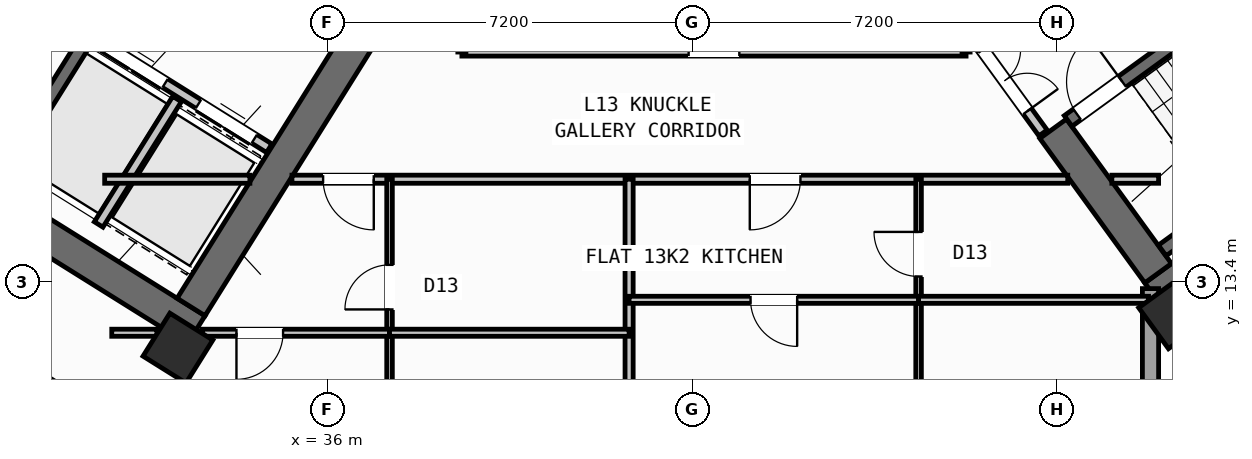
"""IFC4 building model, lengths in metres.
Left out: names, types, materials, properties, quantities, classifications, styles, units other than length and angle.
Written with IfcOpenShell. Run it as: python <this file> out.ifc"""

import sys

from ifc_helpers import new_model, si_unit, direction, frame, frame_2d, origin, origin_2d, place, context, subcontext, project, spatial, rectangle, hollow_rectangle, extrude, source, transform, mapped, element, fill, save


model = new_model("IFC4")
c1 = context("Model", 3, precision=1e-05, world=origin(), true_north=direction((0.0, 1.0)))
c2 = subcontext(c1, "Body", "Model", "MODEL_VIEW")
j1 = project(units=[si_unit("LENGTHUNIT", "METRE"), si_unit("PLANEANGLEUNIT", "RADIAN")], contexts=[c1])
p1 = place(None, origin())
s1 = spatial("IfcSite", under=j1, at=p1, CompositionType="ELEMENT")
p2 = place(p1, origin())
s2 = spatial("IfcBuilding", under=s1, at=p2, CompositionType="ELEMENT")
p3 = place(p2, frame((0.0, 0.0, 52.8)))
s3 = spatial("IfcBuildingStorey", under=s2, at=p3, CompositionType="ELEMENT", Elevation=52.8)
p4 = place(p3, frame((33.409, 12.45, 0.0), z_axis=(0.0, 0.0, 1.0), x_axis=(-0.848051132073, 0.529914405721, 0.0)))
e1 = element("IfcWall", 1, at=p4, inside=s3, PredefinedType="SHEAR", context=c2, shape_type="SweptSolid", body=[
    extrude(rectangle(XDim=13.24, YDim=0.65, at=frame_2d((6.62, 0.0))), origin(), (0.0, 0.0, 1.0), 3.35),
])
p5 = place(p3, frame((36.683, 18.304, 0.0), z_axis=(0.0, 0.0, 1.0), x_axis=(-0.529899109053, -0.848060690178, 0.0)))
e2 = element("IfcWall", 2, at=p5, inside=s3, PredefinedType="SHEAR", context=c2, shape_type="SweptSolid", body=[
    extrude(rectangle(XDim=6.375, YDim=0.65, at=frame_2d((3.188, 0.0))), origin(), (0.0, 0.0, 1.0), 3.35),
])
p6 = place(p3, frame((52.318, 13.11, 0.0), z_axis=(0.0, 0.0, 1.0), x_axis=(0.809019445368, 0.587781878776, 0.0)))
e3 = element("IfcWall", 3, at=p6, inside=s3, PredefinedType="SHEAR", context=c2, shape_type="SweptSolid", body=[
    extrude(rectangle(XDim=12.44, YDim=0.65, at=frame_2d((6.22, 0.0))), origin(), (0.0, 0.0, 1.0), 3.35),
])
p7 = place(p3, frame((52.39, 13.564, 0.0), z_axis=(0.0, 0.0, 1.0), x_axis=(-0.58779688989, 0.809008539037, 0.0)))
e4 = element("IfcWall", 4, at=p7, inside=s3, PredefinedType="SHEAR", context=c2, shape_type="SweptSolid", body=[
    extrude(rectangle(XDim=3.525, YDim=0.65, at=frame_2d((1.763, 0.0))), origin(), (0.0, 0.0, 1.0), 3.35),
])
m1 = source(origin(), c2, "Body", "SweptSolid", [
    extrude(hollow_rectangle(XDim=1.0, YDim=1.0, WallThickness=0.04, at=origin_2d()), origin(), (0.0, 0.0, 1.0), 3.6),
])
for number, where, z_axis, x_axis in (
    (5, (33.046, 12.087, 0.0), (0.0, 0.0, 1.0), (-0.848, 0.53, 0.0)),
    (6, (52.705, 12.773, 0.0), (0.0, 0.0, 1.0), (0.809, 0.588, 0.0)),
):
    element("IfcColumn", number, at=place(p3, frame(where, z_axis=z_axis, x_axis=x_axis)), inside=s3, PredefinedType="COLUMN", context=c2, shape_type="MappedRepresentation", body=[
        mapped(m1, transform((0.0, 0.0, 0.0), scale=1.0)),
    ])
p8 = place(p3, frame((56.581, 7.439, 0.0), z_axis=(0.0, 0.0, 1.0), x_axis=(-0.587785875463, 0.809016541614, 0.0)))
e7 = element("IfcWall", 7, at=p8, inside=s3, PredefinedType="STANDARD", context=c2, shape_type="SweptSolid", body=[
    extrude(rectangle(XDim=6.774, YDim=0.32, at=frame_2d((3.387, 0.0))), origin(), (0.0, 0.0, 1.0), 2.725),
])
p9 = place(p8, frame((1.556, 0.0, 0.8)))
e8 = element("IfcOpeningElement", 8, at=p9, cuts=e7, PredefinedType="OPENING", context=c2, shape_type="SweptSolid", body=[
    extrude(rectangle(XDim=2.1, YDim=1.55, at=frame_2d((1.05, 0.775))), frame((0.0, 0.17, 0.0), z_axis=(0.0, -1.0, 0.0), x_axis=(1.0, 0.0, 0.0)), (0.0, 0.0, 1.0), 0.34),
])
p10 = place(p3, frame((52.24, 13.261, 0.0), z_axis=(0.0, 0.0, 1.0), x_axis=(0.0, -1.0, 0.0)))
e9 = element("IfcWall", 9, at=p10, inside=s3, PredefinedType="STANDARD", context=c2, shape_type="SweptSolid", body=[
    extrude(rectangle(XDim=9.795, YDim=0.32, at=frame_2d((4.897, 0.0))), origin(), (0.0, 0.0, 1.0), 3.35),
])
p11 = place(p10, frame((2.349, 0.0, 0.8)))
e10 = element("IfcOpeningElement", 10, at=p11, cuts=e9, PredefinedType="OPENING", context=c2, shape_type="SweptSolid", body=[
    extrude(rectangle(XDim=2.1, YDim=1.55, at=frame_2d((1.05, 0.775))), frame((0.0, 0.17, 0.0), z_axis=(0.0, -1.0, 0.0), x_axis=(1.0, 0.0, 0.0)), (0.0, 0.0, 1.0), 0.34),
])
p12 = place(p10, frame((7.03, 0.0, 0.85)))
e11 = element("IfcOpeningElement", 11, at=p12, cuts=e9, PredefinedType="OPENING", context=c2, shape_type="SweptSolid", body=[
    extrude(rectangle(XDim=1.8, YDim=1.5, at=frame_2d((0.9, 0.75))), frame((0.0, 0.17, 0.0), z_axis=(0.0, -1.0, 0.0), x_axis=(1.0, 0.0, 0.0)), (0.0, 0.0, 1.0), 0.34),
])
p13 = place(p3, frame((31.288, 18.256, 0.0), z_axis=(0.0, 0.0, 1.0), x_axis=(-0.529943379326, -0.848033026897, 0.0)))
e12 = element("IfcWall", 12, at=p13, inside=s3, PredefinedType="SHEAR", context=c2, shape_type="SweptSolid", body=[
    extrude(rectangle(XDim=3.16, YDim=0.26, at=frame_2d((1.58, 0.0))), origin(), (0.0, 0.0, 1.0), 3.35),
])
p14 = place(p3, frame((34.848, 16.031, 0.0), z_axis=(0.0, 0.0, 1.0), x_axis=(-0.848044042236, 0.529925751807, 0.0)))
e13 = element("IfcWall", 13, at=p14, inside=s3, PredefinedType="STANDARD", context=c2, shape_type="SweptSolid", body=[
    extrude(rectangle(XDim=4.198, YDim=0.2, at=frame_2d((2.099, 0.0))), origin(), (0.0, 0.0, 1.0), 3.34),
])
p15 = place(p14, frame((0.348, 0.0, 0.0)))
e14 = element("IfcOpeningElement", 14, at=p15, cuts=e13, PredefinedType="OPENING", context=c2, shape_type="SweptSolid", body=[
    extrude(rectangle(XDim=1.3, YDim=2.2, at=frame_2d((0.65, 1.1))), frame((0.0, 0.11, 0.0), z_axis=(0.0, -1.0, 0.0), x_axis=(1.0, 0.0, 0.0)), (0.0, 0.0, 1.0), 0.22),
])
p16 = place(p14, frame((2.423, 0.0, 0.0)))
e15 = element("IfcOpeningElement", 15, at=p16, cuts=e13, PredefinedType="OPENING", context=c2, shape_type="SweptSolid", body=[
    extrude(rectangle(XDim=1.45, YDim=2.25, at=frame_2d((0.725, 1.125))), frame((0.0, 0.11, 0.0), z_axis=(0.0, -1.0, 0.0), x_axis=(1.0, 0.0, 0.0)), (0.0, 0.0, 1.0), 0.22),
])
p17 = place(p3, frame((33.029, 17.003, 0.0), z_axis=(0.0, 0.0, 1.0), x_axis=(-0.529916267533, -0.848049968695, 0.0)))
e16 = element("IfcWall", 16, at=p17, inside=s3, PredefinedType="STANDARD", context=c2, shape_type="SweptSolid", body=[
    extrude(rectangle(XDim=2.92, YDim=0.2, at=frame_2d((1.46, 0.0))), origin(), (0.0, 0.0, 1.0), 3.34),
])
p18 = place(p3, frame((52.472, 14.013, 0.0), z_axis=(0.0, 0.0, 1.0), x_axis=(0.809028366311, 0.587769599847, 0.0)))
e17 = element("IfcWall", 17, at=p18, inside=s3, PredefinedType="SHEAR", context=c2, shape_type="SweptSolid", body=[
    extrude(rectangle(XDim=7.33, YDim=0.26, at=frame_2d((3.665, 0.0))), origin(), (0.0, 0.0, 1.0), 3.35),
])
p19 = place(p3, frame((50.615, 16.57, 0.0), z_axis=(0.0, 0.0, 1.0), x_axis=(0.809028366311, 0.587769599847, 0.0)))
e18 = element("IfcWall", 18, at=p19, inside=s3, PredefinedType="SHEAR", context=c2, shape_type="SweptSolid", body=[
    extrude(rectangle(XDim=7.33, YDim=0.26, at=frame_2d((3.665, 0.0))), origin(), (0.0, 0.0, 1.0), 3.35),
])
p20 = place(p19, frame((0.22, 0.0, 0.0)))
e19 = element("IfcOpeningElement", 19, at=p20, cuts=e18, PredefinedType="OPENING", context=c2, shape_type="SweptSolid", body=[
    extrude(rectangle(XDim=1.1, YDim=2.1, at=frame_2d((0.55, 1.05))), frame((0.0, 0.14, 0.0), z_axis=(0.0, -1.0, 0.0), x_axis=(1.0, 0.0, 0.0)), (0.0, 0.0, 1.0), 0.28),
])
p21 = place(p3, frame((32.164, 10.374, 0.0), z_axis=(0.0, 0.0, 1.0), x_axis=(-0.848044107957, 0.529925646633, 0.0)))
e20 = element("IfcWall", 20, at=p21, inside=s3, PredefinedType="PARTITIONING", context=c2, shape_type="SweptSolid", body=[
    extrude(rectangle(XDim=15.57, YDim=0.16, at=frame_2d((7.785, 0.0))), origin(), (0.0, 0.0, 1.0), 3.34),
])
p22 = place(p21, frame((10.83, 0.0, 0.0)))
e21 = element("IfcOpeningElement", 21, at=p22, cuts=e20, PredefinedType="OPENING", context=c2, shape_type="SweptSolid", body=[
    extrude(rectangle(XDim=1.0, YDim=2.1, at=frame_2d((0.5, 1.05))), frame((0.0, 0.09, 0.0), z_axis=(0.0, -1.0, 0.0), x_axis=(1.0, 0.0, 0.0)), (0.0, 0.0, 1.0), 0.18),
])
p23 = place(p3, frame((31.6, 15.42, 0.0), z_axis=(0.0, 0.0, 1.0), x_axis=(1.0, 0.0, 0.0)))
e22 = element("IfcWall", 22, at=p23, inside=s3, PredefinedType="PARTITIONING", context=c2, shape_type="SweptSolid", body=[
    extrude(rectangle(XDim=2.866, YDim=0.16, at=frame_2d((1.433, 0.0))), origin(), (0.0, 0.0, 1.0), 3.34),
])
p24 = place(p3, frame((35.296, 15.42, 0.0), z_axis=(0.0, 0.0, 1.0), x_axis=(1.0, 0.0, 0.0)))
e23 = element("IfcWall", 23, at=p24, inside=s3, PredefinedType="PARTITIONING", context=c2, shape_type="SweptSolid", body=[
    extrude(rectangle(XDim=15.311, YDim=0.16, at=frame_2d((7.655, 0.0))), origin(), (0.0, 0.0, 1.0), 3.34),
])
p25 = place(p24, frame((0.615, 0.0, 0.0)))
e24 = element("IfcOpeningElement", 24, at=p25, cuts=e23, PredefinedType="OPENING", context=c2, shape_type="SweptSolid", body=[
    extrude(rectangle(XDim=1.0, YDim=2.1, at=frame_2d((0.5, 1.05))), frame((0.0, 0.09, 0.0), z_axis=(0.0, -1.0, 0.0), x_axis=(1.0, 0.0, 0.0)), (0.0, 0.0, 1.0), 0.18),
])
p26 = place(p24, frame((9.035, 0.0, 0.0)))
e25 = element("IfcOpeningElement", 25, at=p26, cuts=e23, PredefinedType="OPENING", context=c2, shape_type="SweptSolid", body=[
    extrude(rectangle(XDim=1.0, YDim=2.1, at=frame_2d((0.5, 1.05))), frame((0.0, 0.09, 0.0), z_axis=(0.0, -1.0, 0.0), x_axis=(1.0, 0.0, 0.0)), (0.0, 0.0, 1.0), 0.18),
])
p27 = place(p3, frame((51.477, 15.42, 0.0), z_axis=(0.0, 0.0, 1.0), x_axis=(1.0, 0.0, 0.0)))
e26 = element("IfcWall", 26, at=p27, inside=s3, PredefinedType="PARTITIONING", context=c2, shape_type="SweptSolid", body=[
    extrude(rectangle(XDim=0.923, YDim=0.16, at=frame_2d((0.461, 0.0))), origin(), (0.0, 0.0, 1.0), 3.34),
])
p28 = place(p3, frame((38.65, 17.93, 0.0), z_axis=(0.0, 0.0, 1.0), x_axis=(1.0, 0.0, 0.0)))
e27 = element("IfcWall", 27, at=p28, inside=s3, PredefinedType="PARTITIONING", context=c2, shape_type="SweptSolid", body=[
    extrude(rectangle(XDim=9.95, YDim=0.16, at=frame_2d((4.975, 0.0))), origin(), (0.0, 0.0, 1.0), 3.34),
])
p29 = place(p28, frame((4.475, 0.0, 0.0)))
e28 = element("IfcOpeningElement", 28, at=p29, cuts=e27, PredefinedType="OPENING", context=c2, shape_type="SweptSolid", body=[
    extrude(rectangle(XDim=1.0, YDim=2.1, at=frame_2d((0.5, 1.05))), frame((0.0, 0.09, 0.0), z_axis=(0.0, -1.0, 0.0), x_axis=(1.0, 0.0, 0.0)), (0.0, 0.0, 1.0), 0.18),
])
p30 = place(p3, frame((50.119, 16.333, 0.0), z_axis=(0.0, 0.0, 1.0), x_axis=(-0.587749856981, 0.809042709391, 0.0)))
e29 = element("IfcWall", 29, at=p30, inside=s3, PredefinedType="STANDARD", context=c2, shape_type="SweptSolid", body=[
    extrude(rectangle(XDim=2.96, YDim=0.2, at=frame_2d((1.48, 0.0))), origin(), (0.0, 0.0, 1.0), 3.34),
])
p31 = place(p30, frame((0.53, 0.0, 0.0)))
e30 = element("IfcOpeningElement", 30, at=p31, cuts=e29, PredefinedType="OPENING", context=c2, shape_type="SweptSolid", body=[
    extrude(rectangle(XDim=1.5, YDim=2.15, at=frame_2d((0.75, 1.075))), frame((0.0, 0.11, 0.0), z_axis=(0.0, -1.0, 0.0), x_axis=(1.0, 0.0, 0.0)), (0.0, 0.0, 1.0), 0.22),
])
p32 = place(p3, frame((41.95, 1.96, 0.0), z_axis=(0.0, 0.0, 1.0), x_axis=(0.0, 1.0, 0.0)))
e31 = element("IfcWall", 31, at=p32, inside=s3, PredefinedType="PARTITIONING", context=c2, shape_type="SweptSolid", body=[
    extrude(rectangle(XDim=13.46, YDim=0.16, at=frame_2d((6.73, 0.0))), origin(), (0.0, 0.0, 1.0), 3.34),
])
p33 = place(p3, frame((37.222, 1.96, 0.0), z_axis=(0.0, 0.0, 1.0), x_axis=(0.0, 1.0, 0.0)))
e32 = element("IfcWall", 32, at=p33, inside=s3, PredefinedType="PARTITIONING", context=c2, shape_type="SweptSolid", body=[
    extrude(rectangle(XDim=13.46, YDim=0.11, at=frame_2d((6.73, 0.0))), origin(), (0.0, 0.0, 1.0), 3.34),
])
p34 = place(p33, frame((5.2, 0.0, 0.0)))
e33 = element("IfcOpeningElement", 33, at=p34, cuts=e32, PredefinedType="OPENING", context=c2, shape_type="SweptSolid", body=[
    extrude(rectangle(XDim=0.92, YDim=2.08, at=frame_2d((0.46, 1.04))), frame((0.0, 0.065, 0.0), z_axis=(0.0, -1.0, 0.0), x_axis=(1.0, 0.0, 0.0)), (0.0, 0.0, 1.0), 0.13),
])
p35 = place(p33, frame((10.89, 0.0, 0.0)))
e34 = element("IfcOpeningElement", 34, at=p35, cuts=e32, PredefinedType="OPENING", context=c2, shape_type="SweptSolid", body=[
    extrude(rectangle(XDim=0.88, YDim=2.08, at=frame_2d((0.44, 1.04))), frame((0.0, 0.065, 0.0), z_axis=(0.0, -1.0, 0.0), x_axis=(1.0, 0.0, 0.0)), (0.0, 0.0, 1.0), 0.13),
])
p36 = place(p3, frame((31.74, 12.39, 0.0), z_axis=(0.0, 0.0, 1.0), x_axis=(1.0, 0.0, 0.0)))
e35 = element("IfcWall", 35, at=p36, inside=s3, PredefinedType="PLUMBINGWALL", context=c2, shape_type="SweptSolid", body=[
    extrude(rectangle(XDim=0.892, YDim=0.14, at=frame_2d((0.446, 0.0))), origin(), (0.0, 0.0, 1.0), 3.34),
])
p37 = place(p3, frame((33.527, 12.39, 0.0), z_axis=(0.0, 0.0, 1.0), x_axis=(1.0, 0.0, 0.0)))
e36 = element("IfcWall", 36, at=p37, inside=s3, PredefinedType="PLUMBINGWALL", context=c2, shape_type="SweptSolid", body=[
    extrude(rectangle(XDim=3.695, YDim=0.14, at=frame_2d((1.847, 0.0))), origin(), (0.0, 0.0, 1.0), 2.525),
])
p38 = place(p37, frame((0.674, 0.0, 0.0)))
e37 = element("IfcOpeningElement", 37, at=p38, cuts=e36, PredefinedType="OPENING", context=c2, shape_type="SweptSolid", body=[
    extrude(rectangle(XDim=0.92, YDim=2.08, at=frame_2d((0.46, 1.04))), frame((0.0, 0.08, 0.0), z_axis=(0.0, -1.0, 0.0), x_axis=(1.0, 0.0, 0.0)), (0.0, 0.0, 1.0), 0.16),
])
p39 = place(p3, frame((37.222, 12.39, 0.0), z_axis=(0.0, 0.0, 1.0), x_axis=(1.0, 0.0, 0.0)))
e38 = element("IfcWall", 38, at=p39, inside=s3, PredefinedType="PLUMBINGWALL", context=c2, shape_type="SweptSolid", body=[
    extrude(rectangle(XDim=4.728, YDim=0.14, at=frame_2d((2.364, 0.0))), origin(), (0.0, 0.0, 1.0), 2.525),
])
p40 = place(p3, frame((47.663, 1.96, 0.0), z_axis=(0.0, 0.0, 1.0), x_axis=(0.0, 1.0, 0.0)))
e39 = element("IfcWall", 39, at=p40, inside=s3, PredefinedType="PARTITIONING", context=c2, shape_type="SweptSolid", body=[
    extrude(rectangle(XDim=13.46, YDim=0.11, at=frame_2d((6.73, 0.0))), origin(), (0.0, 0.0, 1.0), 3.34),
])
p41 = place(p40, frame((6.3, 0.0, 0.0)))
e40 = element("IfcOpeningElement", 40, at=p41, cuts=e39, PredefinedType="OPENING", context=c2, shape_type="SweptSolid", body=[
    extrude(rectangle(XDim=0.92, YDim=2.08, at=frame_2d((0.46, 1.04))), frame((0.0, 0.065, 0.0), z_axis=(0.0, -1.0, 0.0), x_axis=(1.0, 0.0, 0.0)), (0.0, 0.0, 1.0), 0.13),
])
p42 = place(p40, frame((11.54, 0.0, 0.0)))
e41 = element("IfcOpeningElement", 41, at=p42, cuts=e39, PredefinedType="OPENING", context=c2, shape_type="SweptSolid", body=[
    extrude(rectangle(XDim=0.88, YDim=2.08, at=frame_2d((0.44, 1.04))), frame((0.0, 0.065, 0.0), z_axis=(0.0, -1.0, 0.0), x_axis=(1.0, 0.0, 0.0)), (0.0, 0.0, 1.0), 0.13),
])
p43 = place(p3, frame((41.95, 13.04, 0.0), z_axis=(0.0, 0.0, 1.0), x_axis=(1.0, 0.0, 0.0)))
e42 = element("IfcWall", 42, at=p43, inside=s3, PredefinedType="PLUMBINGWALL", context=c2, shape_type="SweptSolid", body=[
    extrude(rectangle(XDim=5.713, YDim=0.14, at=frame_2d((2.856, 0.0))), origin(), (0.0, 0.0, 1.0), 3.34),
])
p44 = place(p43, frame((2.396, 0.0, 0.0)))
e43 = element("IfcOpeningElement", 43, at=p44, cuts=e42, PredefinedType="OPENING", context=c2, shape_type="SweptSolid", body=[
    extrude(rectangle(XDim=0.92, YDim=2.08, at=frame_2d((0.46, 1.04))), frame((0.0, 0.08, 0.0), z_axis=(0.0, -1.0, 0.0), x_axis=(1.0, 0.0, 0.0)), (0.0, 0.0, 1.0), 0.16),
])
p45 = place(p3, frame((47.663, 13.04, 0.0), z_axis=(0.0, 0.0, 1.0), x_axis=(1.0, 0.0, 0.0)))
e44 = element("IfcWall", 44, at=p45, inside=s3, PredefinedType="PLUMBINGWALL", context=c2, shape_type="SweptSolid", body=[
    extrude(rectangle(XDim=4.538, YDim=0.14, at=frame_2d((2.269, 0.0))), origin(), (0.0, 0.0, 1.0), 2.525),
])
m2 = source(origin(), c2, "Body", "SweptSolid", [
    extrude(rectangle(XDim=1.3, YDim=2.2, at=frame_2d((0.65, 1.1))), frame((0.0, 0.025, 0.0), z_axis=(0.0, -1.0, 0.0), x_axis=(1.0, 0.0, 0.0)), (0.0, 0.0, 1.0), 0.05),
])
p46 = place(p15, origin())
e45 = element("IfcDoor", 45, at=p46, inside=s3, OperationType="DOUBLE_DOOR_SLIDING", PredefinedType="DOOR", context=c2, shape_type="MappedRepresentation", body=[
    mapped(m2, transform((0.0, 0.0, 0.0), scale=1.0)),
])
fill(e14, e45)
m3 = source(origin(), c2, "Body", "SweptSolid", [
    extrude(rectangle(XDim=1.45, YDim=2.25, at=frame_2d((0.725, 1.125))), frame((0.0, 0.025, 0.0), z_axis=(0.0, -1.0, 0.0), x_axis=(1.0, 0.0, 0.0)), (0.0, 0.0, 1.0), 0.05),
])
p47 = place(p16, origin())
e46 = element("IfcDoor", 46, at=p47, inside=s3, OperationType="DOUBLE_DOOR_SLIDING", PredefinedType="DOOR", context=c2, shape_type="MappedRepresentation", body=[
    mapped(m3, transform((0.0, 0.0, 0.0), scale=1.0)),
])
fill(e15, e46)
m4 = source(origin(), c2, "Body", "SweptSolid", [
    extrude(rectangle(XDim=1.1, YDim=2.1, at=frame_2d((0.55, 1.05))), frame((0.0, 0.025, 0.0), z_axis=(0.0, -1.0, 0.0), x_axis=(1.0, 0.0, 0.0)), (0.0, 0.0, 1.0), 0.05),
])
p48 = place(p20, origin())
e47 = element("IfcDoor", 47, at=p48, inside=s3, OperationType="SINGLE_SWING_RIGHT", PredefinedType="DOOR", context=c2, shape_type="MappedRepresentation", body=[
    mapped(m4, transform((0.0, 0.0, 0.0), scale=1.0)),
])
fill(e19, e47)
m5 = source(origin(), c2, "Body", "SweptSolid", [
    extrude(rectangle(XDim=1.0, YDim=2.1, at=frame_2d((0.5, 1.05))), frame((0.0, 0.025, 0.0), z_axis=(0.0, -1.0, 0.0), x_axis=(1.0, 0.0, 0.0)), (0.0, 0.0, 1.0), 0.05),
])
p49 = place(p29, origin())
e48 = element("IfcDoor", 48, at=p49, inside=s3, OperationType="SINGLE_SWING_RIGHT", PredefinedType="DOOR", context=c2, shape_type="MappedRepresentation", body=[
    mapped(m5, transform((0.0, 0.0, 0.0), scale=1.0)),
])
fill(e28, e48)
m6 = source(origin(), c2, "Body", "SweptSolid", [
    extrude(rectangle(XDim=1.5, YDim=2.15, at=frame_2d((0.75, 1.075))), frame((0.0, 0.025, 0.0), z_axis=(0.0, -1.0, 0.0), x_axis=(1.0, 0.0, 0.0)), (0.0, 0.0, 1.0), 0.05),
])
p50 = place(p31, frame((1.5, 0.0, 0.0), z_axis=(0.0, 0.0, 1.0), x_axis=(-1.0, 0.0, 0.0)))
e49 = element("IfcDoor", 49, at=p50, inside=s3, OperationType="DOUBLE_DOOR_SINGLE_SWING", PredefinedType="DOOR", context=c2, shape_type="MappedRepresentation", body=[
    mapped(m6, transform((0.0, 0.0, 0.0), scale=1.0)),
])
fill(e30, e49)
p51 = place(p25, frame((1.0, 0.0, 0.0), z_axis=(0.0, 0.0, 1.0), x_axis=(-1.0, 0.0, 0.0)))
e50 = element("IfcDoor", 50, at=p51, inside=s3, OperationType="SINGLE_SWING_LEFT", PredefinedType="DOOR", context=c2, shape_type="MappedRepresentation", body=[
    mapped(m5, transform((0.0, 0.0, 0.0), scale=1.0)),
])
fill(e24, e50)
m7 = source(origin(), c2, "Body", "SweptSolid", [
    extrude(rectangle(XDim=0.92, YDim=2.08, at=frame_2d((0.46, 1.04))), frame((0.0, 0.025, 0.0), z_axis=(0.0, -1.0, 0.0), x_axis=(1.0, 0.0, 0.0)), (0.0, 0.0, 1.0), 0.05),
])
p52 = place(p38, frame((0.92, 0.0, 0.0), z_axis=(0.0, 0.0, 1.0), x_axis=(-1.0, 0.0, 0.0)))
e51 = element("IfcDoor", 51, at=p52, inside=s3, OperationType="SINGLE_SWING_RIGHT", PredefinedType="DOOR", context=c2, shape_type="MappedRepresentation", body=[
    mapped(m7, transform((0.0, 0.0, 0.0), scale=1.0)),
])
fill(e37, e51)
m8 = source(origin(), c2, "Body", "SweptSolid", [
    extrude(rectangle(XDim=0.88, YDim=2.08, at=frame_2d((0.44, 1.04))), frame((0.0, 0.025, 0.0), z_axis=(0.0, -1.0, 0.0), x_axis=(1.0, 0.0, 0.0)), (0.0, 0.0, 1.0), 0.05),
])
p53 = place(p35, origin())
e52 = element("IfcDoor", 52, at=p53, inside=s3, OperationType="SINGLE_SWING_LEFT", PredefinedType="DOOR", context=c2, shape_type="MappedRepresentation", body=[
    mapped(m8, transform((0.0, 0.0, 0.0), scale=1.0)),
])
fill(e34, e52)
p54 = place(p26, frame((1.0, 0.0, 0.0), z_axis=(0.0, 0.0, 1.0), x_axis=(-1.0, 0.0, 0.0)))
e53 = element("IfcDoor", 53, at=p54, inside=s3, OperationType="SINGLE_SWING_RIGHT", PredefinedType="DOOR", context=c2, shape_type="MappedRepresentation", body=[
    mapped(m5, transform((0.0, 0.0, 0.0), scale=1.0)),
])
fill(e25, e53)
p55 = place(p44, frame((0.92, 0.0, 0.0), z_axis=(0.0, 0.0, 1.0), x_axis=(-1.0, 0.0, 0.0)))
e54 = element("IfcDoor", 54, at=p55, inside=s3, OperationType="SINGLE_SWING_LEFT", PredefinedType="DOOR", context=c2, shape_type="MappedRepresentation", body=[
    mapped(m7, transform((0.0, 0.0, 0.0), scale=1.0)),
])
fill(e43, e54)
p56 = place(p42, origin())
e55 = element("IfcDoor", 55, at=p56, inside=s3, OperationType="SINGLE_SWING_RIGHT", PredefinedType="DOOR", context=c2, shape_type="MappedRepresentation", body=[
    mapped(m8, transform((0.0, 0.0, 0.0), scale=1.0)),
])
fill(e41, e55)
save(model, sys.argv[1])
